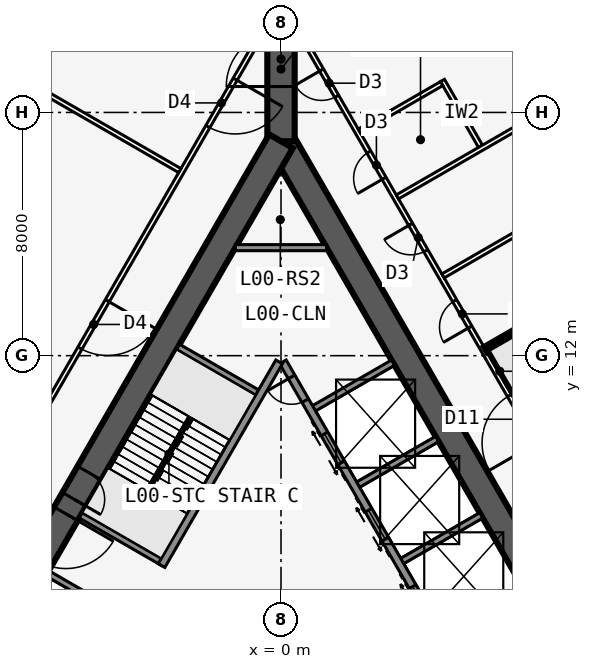
"""IFC4 building model, lengths in metres.
Left out: names, types, materials, properties, quantities, classifications, styles, units other than length and angle.
Written with IfcOpenShell. Run it as: python <this file> out.ifc"""

import sys

from ifc_helpers import new_model, si_unit, direction, frame, frame_2d, origin, place, context, subcontext, project, spatial, rectangle, extrude, element, fill, save


model = new_model("IFC4")
c1 = context("Model", 3, precision=1e-05, world=origin(), true_north=direction((0.0, 1.0)))
c2 = subcontext(c1, "Body", "Model", "MODEL_VIEW")
j1 = project(units=[si_unit("LENGTHUNIT", "METRE"), si_unit("PLANEANGLEUNIT", "RADIAN")], contexts=[c1])
p1 = place(None, origin())
s1 = spatial("IfcSite", under=j1, at=p1, CompositionType="ELEMENT")
p2 = place(p1, origin())
s2 = spatial("IfcBuilding", under=s1, at=p2, CompositionType="ELEMENT")
p3 = place(p2, origin())
s3 = spatial("IfcBuildingStorey", under=s2, at=p3, CompositionType="ELEMENT", Elevation=0.0)
p4 = place(p3, frame((16.5, -9.526, -0.3), z_axis=(0.0, 0.0, 1.0), x_axis=(-0.499999749417, 0.866025548458, 0.0)))
e1 = element("IfcWall", 1, at=p4, inside=s3, PredefinedType="SHEAR", context=c2, shape_type="SweptSolid", body=[
    extrude(rectangle(XDim=33.0, YDim=0.9, at=frame_2d((16.5, 0.0))), origin(), (0.0, 0.0, 1.0), 6.3),
])
p5 = place(p4, frame((14.15, 0.0, 0.3)))
e2 = element("IfcOpeningElement", 2, at=p5, cuts=e1, PredefinedType="OPENING", context=c2, shape_type="SweptSolid", body=[
    extrude(rectangle(XDim=1.8, YDim=2.13, at=frame_2d((0.9, 1.065))), frame((0.0, 0.46, 0.0), z_axis=(0.0, -1.0, 0.0), x_axis=(1.0, 0.0, 0.0)), (0.0, 0.0, 1.0), 0.92),
])
p6 = place(p4, frame((12.6, 0.0, 0.3)))
e3 = element("IfcOpeningElement", 3, at=p6, cuts=e1, PredefinedType="OPENING", context=c2, shape_type="SweptSolid", body=[
    extrude(rectangle(XDim=1.0, YDim=2.13, at=frame_2d((0.5, 1.065))), frame((0.0, 0.46, 0.0), z_axis=(0.0, -1.0, 0.0), x_axis=(1.0, 0.0, 0.0)), (0.0, 0.0, 1.0), 0.92),
])
p7 = place(p3, frame((5.379, 2.586, -0.3), z_axis=(0.0, 0.0, 1.0), x_axis=(-0.500001375892, 0.866024609411, 0.0)))
e4 = element("IfcWall", 4, at=p7, inside=s3, PredefinedType="SOLIDWALL", context=c2, shape_type="SweptSolid", body=[
    extrude(rectangle(XDim=10.633, YDim=0.25, at=frame_2d((5.316, 0.0))), origin(), (0.0, 0.0, 1.0), 6.05),
])
p8 = place(p7, frame((9.164, 0.0, 0.3)))
e5 = element("IfcOpeningElement", 5, at=p8, cuts=e4, PredefinedType="OPENING", context=c2, shape_type="SweptSolid", body=[
    extrude(rectangle(XDim=0.9, YDim=2.13, at=frame_2d((0.45, 1.065))), frame((0.0, 0.135, 0.0), z_axis=(0.0, -1.0, 0.0), x_axis=(1.0, 0.0, 0.0)), (0.0, 0.0, 1.0), 0.27),
])
p9 = place(p7, frame((1.0, 0.0, 0.3)))
e6 = element("IfcOpeningElement", 6, at=p9, cuts=e4, PredefinedType="OPENING", context=c2, shape_type="SweptSolid", body=[
    extrude(rectangle(XDim=1.1, YDim=2.13, at=frame_2d((0.55, 1.065))), frame((0.0, 0.135, 0.0), z_axis=(0.0, -1.0, 0.0), x_axis=(1.0, 0.0, 0.0)), (0.0, 0.0, 1.0), 0.27),
])
p10 = place(p7, frame((3.9, 0.0, 0.3)))
e7 = element("IfcOpeningElement", 7, at=p10, cuts=e4, PredefinedType="OPENING", context=c2, shape_type="SweptSolid", body=[
    extrude(rectangle(XDim=1.1, YDim=2.13, at=frame_2d((0.55, 1.065))), frame((0.0, 0.135, 0.0), z_axis=(0.0, -1.0, 0.0), x_axis=(1.0, 0.0, 0.0)), (0.0, 0.0, 1.0), 0.27),
])
p11 = place(p7, frame((6.8, 0.0, 0.3)))
e8 = element("IfcOpeningElement", 8, at=p11, cuts=e4, PredefinedType="OPENING", context=c2, shape_type="SweptSolid", body=[
    extrude(rectangle(XDim=1.1, YDim=2.13, at=frame_2d((0.55, 1.065))), frame((0.0, 0.135, 0.0), z_axis=(0.0, -1.0, 0.0), x_axis=(1.0, 0.0, 0.0)), (0.0, 0.0, 1.0), 0.27),
])
for number, where, z_axis, x_axis in (
    (9, (3.879, 5.184, -0.3), (0.0, 0.0, 1.0), (0.866, 0.5, 0.0)),
    (10, (2.429, 7.696, -0.3), (0.0, 0.0, 1.0), (0.866, 0.5, 0.0)),
    (11, (0.979, 10.207, -0.3), (0.0, 0.0, 1.0), (0.866, 0.5, 0.0)),
):
    element("IfcWall", number, at=place(p3, frame(where, z_axis=z_axis, x_axis=x_axis)), inside=s3, PredefinedType="SOLIDWALL", context=c2, shape_type="SweptSolid", body=[
        extrude(rectangle(XDim=3.125, YDim=0.2, at=frame_2d((1.562, 0.0))), origin(), (0.0, 0.0, 1.0), 6.05),
    ])
p12 = place(p3, frame((0.0, 19.052, -0.3), z_axis=(0.0, 0.0, 1.0), x_axis=(-0.499999749417, -0.866025548458, 0.0)))
e12 = element("IfcWall", 12, at=p12, inside=s3, PredefinedType="SHEAR", context=c2, shape_type="SweptSolid", body=[
    extrude(rectangle(XDim=33.0, YDim=0.9, at=frame_2d((16.5, 0.0))), origin(), (0.0, 0.0, 1.0), 6.3),
])
p13 = place(p12, frame((14.15, 0.0, 0.3)))
e13 = element("IfcOpeningElement", 13, at=p13, cuts=e12, PredefinedType="OPENING", context=c2, shape_type="SweptSolid", body=[
    extrude(rectangle(XDim=1.8, YDim=2.13, at=frame_2d((0.9, 1.065))), frame((0.0, 0.46, 0.0), z_axis=(0.0, -1.0, 0.0), x_axis=(1.0, 0.0, 0.0)), (0.0, 0.0, 1.0), 0.92),
])
p14 = place(p12, frame((12.6, 0.0, 0.3)))
e14 = element("IfcOpeningElement", 14, at=p14, cuts=e12, PredefinedType="OPENING", context=c2, shape_type="SweptSolid", body=[
    extrude(rectangle(XDim=1.0, YDim=2.13, at=frame_2d((0.5, 1.065))), frame((0.0, 0.46, 0.0), z_axis=(0.0, -1.0, 0.0), x_axis=(1.0, 0.0, 0.0)), (0.0, 0.0, 1.0), 0.92),
])
p15 = place(p3, frame((-0.062, 11.794, -0.3), z_axis=(0.0, 0.0, 1.0), x_axis=(-0.500006680225, -0.86602154692, 0.0)))
e15 = element("IfcWall", 15, at=p15, inside=s3, PredefinedType="SOLIDWALL", context=c2, shape_type="SweptSolid", body=[
    extrude(rectangle(XDim=7.733, YDim=0.25, at=frame_2d((3.866, 0.0))), origin(), (0.0, 0.0, 1.0), 6.05),
])
for number, where, z_axis, x_axis in (
    (16, (-0.679, 10.727, -0.3), (0.0, 0.0, 1.0), (-0.866, 0.5, 0.0)),
    (17, (-3.879, 5.184, -0.3), (0.0, 0.0, 1.0), (-0.866, 0.5, 0.0)),
    (18, (-4.979, 3.279, -0.3), (0.0, 0.0, 1.0), (-0.866, 0.5, 0.0)),
):
    element("IfcWall", number, at=place(p3, frame(where, z_axis=z_axis, x_axis=x_axis)), inside=s3, PredefinedType="SOLIDWALL", context=c2, shape_type="SweptSolid", body=[
        extrude(rectangle(XDim=3.125, YDim=0.2, at=frame_2d((1.562, 0.0))), origin(), (0.0, 0.0, 1.0), 6.05),
    ])
p16 = place(p3, frame((0.0, 19.052, -0.3), z_axis=(0.0, 0.0, 1.0), x_axis=(0.0, 1.0, 0.0)))
e19 = element("IfcWall", 19, at=p16, inside=s3, PredefinedType="SHEAR", context=c2, shape_type="SweptSolid", body=[
    extrude(rectangle(XDim=4.746, YDim=0.9, at=frame_2d((2.373, 0.0))), origin(), (0.0, 0.0, 1.0), 6.3),
])
p17 = place(p16, frame((1.8, 0.0, 0.3)))
e20 = element("IfcOpeningElement", 20, at=p17, cuts=e19, PredefinedType="OPENING", context=c2, shape_type="SweptSolid", body=[
    extrude(rectangle(XDim=1.8, YDim=2.13, at=frame_2d((0.9, 1.065))), frame((0.0, 0.46, 0.0), z_axis=(0.0, -1.0, 0.0), x_axis=(1.0, 0.0, 0.0)), (0.0, 0.0, 1.0), 0.92),
])
p18 = place(p3, frame((20.027, -10.985, -0.3), z_axis=(0.0, 0.0, 1.0), x_axis=(-0.500001677587, 0.866024435227, 0.0)))
e21 = element("IfcWall", 21, at=p18, inside=s3, PredefinedType="PARTITIONING", context=c2, shape_type="SweptSolid", body=[
    extrude(rectangle(XDim=39.054, YDim=0.15, at=frame_2d((19.527, 0.0))), origin(), (0.0, 0.0, 1.0), 5.108),
])
p19 = place(p18, frame((8.427, 0.0, 0.3)))
e22 = element("IfcOpeningElement", 22, at=p19, cuts=e21, PredefinedType="OPENING", context=c2, shape_type="SweptSolid", body=[
    extrude(rectangle(XDim=1.8, YDim=2.13, at=frame_2d((0.9, 1.065))), frame((0.0, 0.085, 0.0), z_axis=(0.0, -1.0, 0.0), x_axis=(1.0, 0.0, 0.0)), (0.0, 0.0, 1.0), 0.17),
])
p20 = place(p18, frame((18.427, 0.0, 0.3)))
e23 = element("IfcOpeningElement", 23, at=p20, cuts=e21, PredefinedType="OPENING", context=c2, shape_type="SweptSolid", body=[
    extrude(rectangle(XDim=1.8, YDim=2.13, at=frame_2d((0.9, 1.065))), frame((0.0, 0.085, 0.0), z_axis=(0.0, -1.0, 0.0), x_axis=(1.0, 0.0, 0.0)), (0.0, 0.0, 1.0), 0.17),
])
p21 = place(p18, frame((23.227, 0.0, 0.3)))
e24 = element("IfcOpeningElement", 24, at=p21, cuts=e21, PredefinedType="OPENING", context=c2, shape_type="SweptSolid", body=[
    extrude(rectangle(XDim=1.8, YDim=2.13, at=frame_2d((0.9, 1.065))), frame((0.0, 0.085, 0.0), z_axis=(0.0, -1.0, 0.0), x_axis=(1.0, 0.0, 0.0)), (0.0, 0.0, 1.0), 0.17),
])
p22 = place(p18, frame((27.627, 0.0, 0.3)))
e25 = element("IfcOpeningElement", 25, at=p22, cuts=e21, PredefinedType="OPENING", context=c2, shape_type="SweptSolid", body=[
    extrude(rectangle(XDim=1.0, YDim=2.13, at=frame_2d((0.5, 1.065))), frame((0.0, 0.085, 0.0), z_axis=(0.0, -1.0, 0.0), x_axis=(1.0, 0.0, 0.0)), (0.0, 0.0, 1.0), 0.17),
])
p23 = place(p18, frame((30.527, 0.0, 0.3)))
e26 = element("IfcOpeningElement", 26, at=p23, cuts=e21, PredefinedType="OPENING", context=c2, shape_type="SweptSolid", body=[
    extrude(rectangle(XDim=1.0, YDim=2.13, at=frame_2d((0.5, 1.065))), frame((0.0, 0.085, 0.0), z_axis=(0.0, -1.0, 0.0), x_axis=(1.0, 0.0, 0.0)), (0.0, 0.0, 1.0), 0.17),
])
p24 = place(p18, frame((33.277, 0.0, 0.3)))
e27 = element("IfcOpeningElement", 27, at=p24, cuts=e21, PredefinedType="OPENING", context=c2, shape_type="SweptSolid", body=[
    extrude(rectangle(XDim=1.0, YDim=2.13, at=frame_2d((0.5, 1.065))), frame((0.0, 0.085, 0.0), z_axis=(0.0, -1.0, 0.0), x_axis=(1.0, 0.0, 0.0)), (0.0, 0.0, 1.0), 0.17),
])
p25 = place(p18, frame((36.39, 0.0, 0.3)))
e28 = element("IfcOpeningElement", 28, at=p25, cuts=e21, PredefinedType="OPENING", context=c2, shape_type="SweptSolid", body=[
    extrude(rectangle(XDim=1.0, YDim=2.13, at=frame_2d((0.5, 1.065))), frame((0.0, 0.085, 0.0), z_axis=(0.0, -1.0, 0.0), x_axis=(1.0, 0.0, 0.0)), (0.0, 0.0, 1.0), 0.17),
])
p26 = place(p3, frame((6.729, 12.198, -0.3), z_axis=(0.0, 0.0, 1.0), x_axis=(0.866025976348, 0.499999008289, 0.0)))
e29 = element("IfcWall", 29, at=p26, inside=s3, PredefinedType="SHEAR", context=c2, shape_type="SweptSolid", body=[
    extrude(rectangle(XDim=20.734, YDim=0.2, at=frame_2d((10.367, 0.0))), origin(), (0.0, 0.0, 1.0), 6.3),
])
p27 = place(p3, frame((5.329, 14.623, -0.3), z_axis=(0.0, 0.0, 1.0), x_axis=(0.866021414031, 0.500006910393, 0.0)))
e30 = element("IfcWall", 30, at=p27, inside=s3, PredefinedType="PARTITIONING", context=c2, shape_type="SweptSolid", body=[
    extrude(rectangle(XDim=20.678, YDim=0.15, at=frame_2d((10.339, 0.0))), origin(), (0.0, 0.0, 1.0), 5.108),
])
p28 = place(p3, frame((3.829, 17.221, -0.3), z_axis=(0.0, 0.0, 1.0), x_axis=(0.866020381737, 0.50000869834, 0.0)))
e31 = element("IfcWall", 31, at=p28, inside=s3, PredefinedType="PARTITIONING", context=c2, shape_type="SweptSolid", body=[
    extrude(rectangle(XDim=20.574, YDim=0.15, at=frame_2d((10.287, 0.0))), origin(), (0.0, 0.0, 1.0), 6.05),
])
p29 = place(p3, frame((6.562, 18.886, -0.3), z_axis=(0.0, 0.0, 1.0), x_axis=(-0.500004234368, 0.866022959057, 0.0)))
e32 = element("IfcWall", 32, at=p29, inside=s3, PredefinedType="PARTITIONING", context=c2, shape_type="SweptSolid", body=[
    extrude(rectangle(XDim=2.5, YDim=0.15, at=frame_2d((1.25, 0.0))), origin(), (0.0, 0.0, 1.0), 6.05),
])
p30 = place(p3, frame((2.579, 19.386, -0.3), z_axis=(0.0, 0.0, 1.0), x_axis=(0.866022959057, 0.500004234368, 0.0)))
e33 = element("IfcWall", 33, at=p30, inside=s3, PredefinedType="PARTITIONING", context=c2, shape_type="SweptSolid", body=[
    extrude(rectangle(XDim=3.125, YDim=0.15, at=frame_2d((1.562, 0.0))), origin(), (0.0, 0.0, 1.0), 6.05),
])
p31 = place(p3, frame((-0.5, 22.836, -0.3), z_axis=(0.0, 0.0, 1.0), x_axis=(-0.500001677587, -0.866024435227, 0.0)))
e34 = element("IfcWall", 34, at=p31, inside=s3, PredefinedType="PARTITIONING", context=c2, shape_type="SweptSolid", body=[
    extrude(rectangle(XDim=39.054, YDim=0.15, at=frame_2d((19.527, 0.0))), origin(), (0.0, 0.0, 1.0), 5.108),
])
p32 = place(p31, frame((2.013, 0.0, 0.3)))
e35 = element("IfcOpeningElement", 35, at=p32, cuts=e34, PredefinedType="OPENING", context=c2, shape_type="SweptSolid", body=[
    extrude(rectangle(XDim=1.8, YDim=2.13, at=frame_2d((0.9, 1.065))), frame((0.0, 0.085, 0.0), z_axis=(0.0, -1.0, 0.0), x_axis=(1.0, 0.0, 0.0)), (0.0, 0.0, 1.0), 0.17),
])
p33 = place(p31, frame((10.427, 0.0, 0.3)))
e36 = element("IfcOpeningElement", 36, at=p33, cuts=e34, PredefinedType="OPENING", context=c2, shape_type="SweptSolid", body=[
    extrude(rectangle(XDim=1.8, YDim=2.13, at=frame_2d((0.9, 1.065))), frame((0.0, 0.085, 0.0), z_axis=(0.0, -1.0, 0.0), x_axis=(1.0, 0.0, 0.0)), (0.0, 0.0, 1.0), 0.17),
])
p34 = place(p31, frame((18.427, 0.0, 0.3)))
e37 = element("IfcOpeningElement", 37, at=p34, cuts=e34, PredefinedType="OPENING", context=c2, shape_type="SweptSolid", body=[
    extrude(rectangle(XDim=1.8, YDim=2.13, at=frame_2d((0.9, 1.065))), frame((0.0, 0.085, 0.0), z_axis=(0.0, -1.0, 0.0), x_axis=(1.0, 0.0, 0.0)), (0.0, 0.0, 1.0), 0.17),
])
p35 = place(p31, frame((23.227, 0.0, 0.3)))
e38 = element("IfcOpeningElement", 38, at=p35, cuts=e34, PredefinedType="OPENING", context=c2, shape_type="SweptSolid", body=[
    extrude(rectangle(XDim=1.8, YDim=2.13, at=frame_2d((0.9, 1.065))), frame((0.0, 0.085, 0.0), z_axis=(0.0, -1.0, 0.0), x_axis=(1.0, 0.0, 0.0)), (0.0, 0.0, 1.0), 0.17),
])
p36 = place(p31, frame((27.627, 0.0, 0.3)))
e39 = element("IfcOpeningElement", 39, at=p36, cuts=e34, PredefinedType="OPENING", context=c2, shape_type="SweptSolid", body=[
    extrude(rectangle(XDim=1.0, YDim=2.13, at=frame_2d((0.5, 1.065))), frame((0.0, 0.085, 0.0), z_axis=(0.0, -1.0, 0.0), x_axis=(1.0, 0.0, 0.0)), (0.0, 0.0, 1.0), 0.17),
])
p37 = place(p31, frame((30.277, 0.0, 0.3)))
e40 = element("IfcOpeningElement", 40, at=p37, cuts=e34, PredefinedType="OPENING", context=c2, shape_type="SweptSolid", body=[
    extrude(rectangle(XDim=1.0, YDim=2.13, at=frame_2d((0.5, 1.065))), frame((0.0, 0.085, 0.0), z_axis=(0.0, -1.0, 0.0), x_axis=(1.0, 0.0, 0.0)), (0.0, 0.0, 1.0), 0.17),
])
p38 = place(p31, frame((34.89, 0.0, 0.3)))
e41 = element("IfcOpeningElement", 41, at=p38, cuts=e34, PredefinedType="OPENING", context=c2, shape_type="SweptSolid", body=[
    extrude(rectangle(XDim=1.0, YDim=2.13, at=frame_2d((0.5, 1.065))), frame((0.0, 0.085, 0.0), z_axis=(0.0, -1.0, 0.0), x_axis=(1.0, 0.0, 0.0)), (0.0, 0.0, 1.0), 0.17),
])
p39 = place(p3, frame((-3.329, 18.087, -0.3), z_axis=(0.0, 0.0, 1.0), x_axis=(-0.866020300771, 0.500008838574, 0.0)))
e42 = element("IfcWall", 42, at=p39, inside=s3, PredefinedType="PARTITIONING", context=c2, shape_type="SweptSolid", body=[
    extrude(rectangle(XDim=20.539, YDim=0.15, at=frame_2d((10.27, 0.0))), origin(), (0.0, 0.0, 1.0), 6.05),
])
p40 = place(p3, frame((-1.501, 15.552, -0.3), z_axis=(0.0, 0.0, 1.0), x_axis=(1.0, 0.0, 0.0)))
e43 = element("IfcWall", 43, at=p40, inside=s3, PredefinedType="SOLIDWALL", context=c2, shape_type="SweptSolid", body=[
    extrude(rectangle(XDim=3.002, YDim=0.2, at=frame_2d((1.501, 0.0))), origin(), (0.0, 0.0, 1.0), 6.05),
])
p41 = place(p3, frame((-2.988, 9.978, 0.0), z_axis=(0.0, 0.0, 1.0), x_axis=(-0.499992232847, -0.866029888106, 0.0)))
e44 = element("IfcWall", 44, at=p41, inside=s3, PredefinedType="SOLIDWALL", context=c2, shape_type="SweptSolid", body=[
    extrude(rectangle(XDim=2.794, YDim=0.1, at=frame_2d((1.397, 0.0))), origin(), (0.0, 0.0, 1.0), 6.0),
])
p42 = place(p3, frame((7.572, 10.838, -0.3), z_axis=(0.0, 0.0, 1.0), x_axis=(-0.499990139034, 0.866031096941, 0.0)))
e45 = element("IfcWall", 45, at=p42, inside=s3, PredefinedType="SOLIDWALL", context=c2, shape_type="SweptSolid", body=[
    extrude(rectangle(XDim=1.5, YDim=0.1, at=frame_2d((0.75, 0.0))), origin(), (0.0, 0.0, 1.0), 6.3),
])
p43 = place(p21, origin())
e46 = element("IfcDoor", 46, at=p43, inside=s3, OperationType="DOUBLE_DOOR_SINGLE_SWING", PredefinedType="DOOR", context=c2, shape_type="SweptSolid", body=[
    extrude(rectangle(XDim=1.8, YDim=2.13, at=frame_2d((0.9, 1.065))), frame((0.0, 0.025, 0.0), z_axis=(0.0, -1.0, 0.0), x_axis=(1.0, 0.0, 0.0)), (0.0, 0.0, 1.0), 0.05),
])
fill(e24, e46)
p44 = place(p22, origin())
e47 = element("IfcDoor", 47, at=p44, inside=s3, OperationType="SINGLE_SWING_LEFT", PredefinedType="DOOR", context=c2, shape_type="SweptSolid", body=[
    extrude(rectangle(XDim=1.0, YDim=2.13, at=frame_2d((0.5, 1.065))), frame((0.0, 0.025, 0.0), z_axis=(0.0, -1.0, 0.0), x_axis=(1.0, 0.0, 0.0)), (0.0, 0.0, 1.0), 0.05),
])
fill(e25, e47)
p45 = place(p23, origin())
e48 = element("IfcDoor", 48, at=p45, inside=s3, OperationType="SINGLE_SWING_RIGHT", PredefinedType="DOOR", context=c2, shape_type="SweptSolid", body=[
    extrude(rectangle(XDim=1.0, YDim=2.13, at=frame_2d((0.5, 1.065))), frame((0.0, 0.025, 0.0), z_axis=(0.0, -1.0, 0.0), x_axis=(1.0, 0.0, 0.0)), (0.0, 0.0, 1.0), 0.05),
])
fill(e26, e48)
p46 = place(p24, origin())
e49 = element("IfcDoor", 49, at=p46, inside=s3, OperationType="SINGLE_SWING_LEFT", PredefinedType="DOOR", context=c2, shape_type="SweptSolid", body=[
    extrude(rectangle(XDim=1.0, YDim=2.13, at=frame_2d((0.5, 1.065))), frame((0.0, 0.025, 0.0), z_axis=(0.0, -1.0, 0.0), x_axis=(1.0, 0.0, 0.0)), (0.0, 0.0, 1.0), 0.05),
])
fill(e27, e49)
p47 = place(p25, origin())
e50 = element("IfcDoor", 50, at=p47, inside=s3, OperationType="SINGLE_SWING_RIGHT", PredefinedType="DOOR", context=c2, shape_type="SweptSolid", body=[
    extrude(rectangle(XDim=1.0, YDim=2.13, at=frame_2d((0.5, 1.065))), frame((0.0, 0.025, 0.0), z_axis=(0.0, -1.0, 0.0), x_axis=(1.0, 0.0, 0.0)), (0.0, 0.0, 1.0), 0.05),
])
fill(e28, e50)
p48 = place(p32, origin())
e51 = element("IfcDoor", 51, at=p48, inside=s3, OperationType="DOUBLE_DOOR_SINGLE_SWING", PredefinedType="DOOR", context=c2, shape_type="SweptSolid", body=[
    extrude(rectangle(XDim=1.8, YDim=2.13, at=frame_2d((0.9, 1.065))), frame((0.0, 0.025, 0.0), z_axis=(0.0, -1.0, 0.0), x_axis=(1.0, 0.0, 0.0)), (0.0, 0.0, 1.0), 0.05),
])
fill(e35, e51)
p49 = place(p33, origin())
e52 = element("IfcDoor", 52, at=p49, inside=s3, OperationType="DOUBLE_DOOR_SINGLE_SWING", PredefinedType="DOOR", context=c2, shape_type="SweptSolid", body=[
    extrude(rectangle(XDim=1.8, YDim=2.13, at=frame_2d((0.9, 1.065))), frame((0.0, 0.025, 0.0), z_axis=(0.0, -1.0, 0.0), x_axis=(1.0, 0.0, 0.0)), (0.0, 0.0, 1.0), 0.05),
])
fill(e36, e52)
p50 = place(p13, origin())
e53 = element("IfcDoor", 53, at=p50, inside=s3, OperationType="DOUBLE_DOOR_SINGLE_SWING", PredefinedType="DOOR", context=c2, shape_type="SweptSolid", body=[
    extrude(rectangle(XDim=1.8, YDim=2.13, at=frame_2d((0.9, 1.065))), frame((0.0, 0.025, 0.0), z_axis=(0.0, -1.0, 0.0), x_axis=(1.0, 0.0, 0.0)), (0.0, 0.0, 1.0), 0.05),
])
fill(e13, e53)
p51 = place(p14, origin())
e54 = element("IfcDoor", 54, at=p51, inside=s3, OperationType="SINGLE_SWING_RIGHT", PredefinedType="DOOR", context=c2, shape_type="SweptSolid", body=[
    extrude(rectangle(XDim=1.0, YDim=2.13, at=frame_2d((0.5, 1.065))), frame((0.0, 0.025, 0.0), z_axis=(0.0, -1.0, 0.0), x_axis=(1.0, 0.0, 0.0)), (0.0, 0.0, 1.0), 0.05),
])
fill(e14, e54)
p52 = place(p17, origin())
e55 = element("IfcDoor", 55, at=p52, inside=s3, OperationType="DOUBLE_DOOR_DOUBLE_SWING", PredefinedType="DOOR", context=c2, shape_type="SweptSolid", body=[
    extrude(rectangle(XDim=1.8, YDim=2.13, at=frame_2d((0.9, 1.065))), frame((0.0, 0.025, 0.0), z_axis=(0.0, -1.0, 0.0), x_axis=(1.0, 0.0, 0.0)), (0.0, 0.0, 1.0), 0.05),
])
fill(e20, e55)
p53 = place(p8, origin())
e56 = element("IfcDoor", 56, at=p53, inside=s3, OperationType="SINGLE_SWING_RIGHT", PredefinedType="DOOR", context=c2, shape_type="SweptSolid", body=[
    extrude(rectangle(XDim=0.9, YDim=2.13, at=frame_2d((0.45, 1.065))), frame((0.0, 0.025, 0.0), z_axis=(0.0, -1.0, 0.0), x_axis=(1.0, 0.0, 0.0)), (0.0, 0.0, 1.0), 0.05),
])
fill(e5, e56)
p54 = place(p9, origin())
e57 = element("IfcDoor", 57, at=p54, inside=s3, OperationType="DOUBLE_DOOR_SLIDING", PredefinedType="USERDEFINED", context=c2, shape_type="SweptSolid", body=[
    extrude(rectangle(XDim=1.1, YDim=2.13, at=frame_2d((0.55, 1.065))), frame((0.0, 0.025, 0.0), z_axis=(0.0, -1.0, 0.0), x_axis=(1.0, 0.0, 0.0)), (0.0, 0.0, 1.0), 0.05),
])
fill(e6, e57)
p55 = place(p10, origin())
e58 = element("IfcDoor", 58, at=p55, inside=s3, OperationType="DOUBLE_DOOR_SLIDING", PredefinedType="USERDEFINED", context=c2, shape_type="SweptSolid", body=[
    extrude(rectangle(XDim=1.1, YDim=2.13, at=frame_2d((0.55, 1.065))), frame((0.0, 0.025, 0.0), z_axis=(0.0, -1.0, 0.0), x_axis=(1.0, 0.0, 0.0)), (0.0, 0.0, 1.0), 0.05),
])
fill(e7, e58)
p56 = place(p11, origin())
e59 = element("IfcDoor", 59, at=p56, inside=s3, OperationType="DOUBLE_DOOR_SLIDING", PredefinedType="USERDEFINED", context=c2, shape_type="SweptSolid", body=[
    extrude(rectangle(XDim=1.1, YDim=2.13, at=frame_2d((0.55, 1.065))), frame((0.0, 0.025, 0.0), z_axis=(0.0, -1.0, 0.0), x_axis=(1.0, 0.0, 0.0)), (0.0, 0.0, 1.0), 0.05),
])
fill(e8, e59)
save(model, sys.argv[1])
